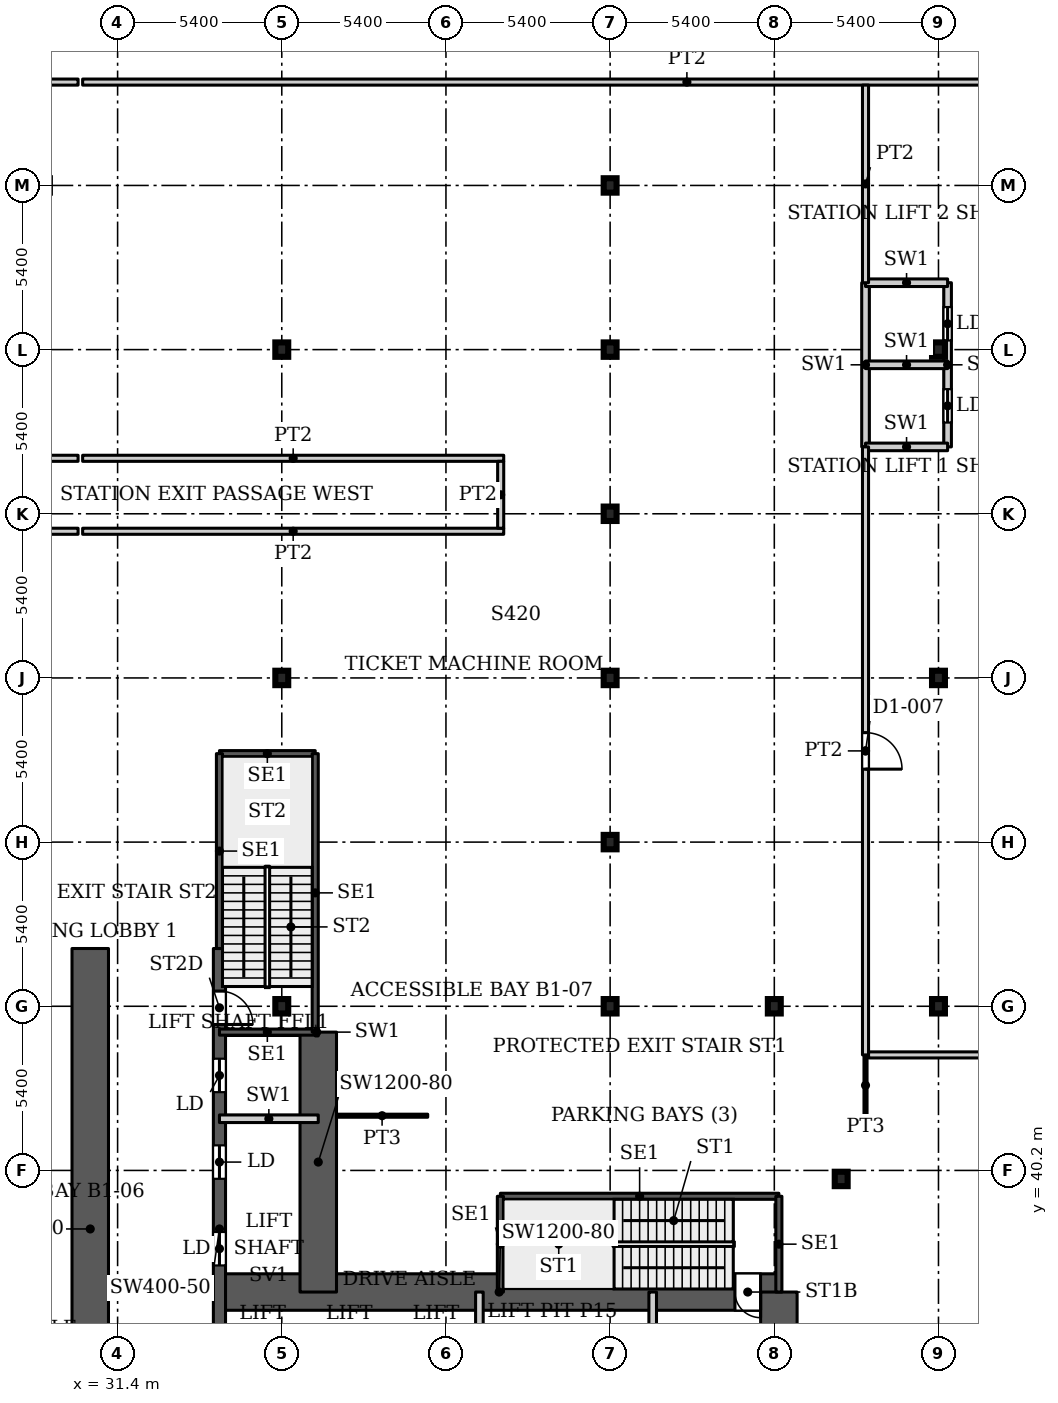
"""IFC4 building model, lengths in metres.
Left out: names, types, materials, properties, quantities, classifications, styles, units other than length and angle.
Written with IfcOpenShell. Run it as: python <this file> out.ifc"""

import sys

from ifc_helpers import new_model, si_unit, direction, frame, frame_2d, origin, origin_2d, place, context, subcontext, project, spatial, rectangle, i_section, extrude, source, transform, mapped, element, fill, save


model = new_model("IFC4")
c1 = context("Model", 3, precision=1e-05, world=origin(), true_north=direction((0.0, 1.0)))
c2 = subcontext(c1, "Body", "Model", "MODEL_VIEW")
j1 = project(units=[si_unit("LENGTHUNIT", "METRE"), si_unit("PLANEANGLEUNIT", "RADIAN")], contexts=[c1])
p1 = place(None, origin())
s1 = spatial("IfcSite", under=j1, at=p1, CompositionType="ELEMENT")
p2 = place(p1, origin())
s2 = spatial("IfcBuilding", under=s1, at=p2, CompositionType="ELEMENT")
p3 = place(p2, frame((0.0, 0.0, -5.0)))
s3 = spatial("IfcBuildingStorey", under=s2, at=p3, CompositionType="ELEMENT", Elevation=-5.0)
for number, where, z_axis, x_axis in (
    (1, (36.8, 45.6, 0.0), (0.0, 0.0, 1.0), (1.0, 0.0, 0.0)),
    (2, (47.6, 45.6, 0.0), (0.0, 0.0, 1.0), (1.0, 0.0, 0.0)),
    (3, (58.4, 45.6, 0.0), (0.0, 0.0, 1.0), (1.0, 0.0, 0.0)),
    (4, (36.8, 56.4, 0.0), (0.0, 0.0, 1.0), (1.0, 0.0, 0.0)),
    (5, (47.6, 56.4, 0.0), (0.0, 0.0, 1.0), (1.0, 0.0, 0.0)),
    (6, (58.4, 56.4, 0.0), (0.0, 0.0, 1.0), (1.0, 0.0, 0.0)),
    (7, (36.8, 67.2, 0.0), (0.0, 0.0, 1.0), (1.0, 0.0, 0.0)),
    (8, (47.6, 67.2, 0.0), (0.0, 0.0, 1.0), (1.0, 0.0, 0.0)),
    (9, (58.4, 67.2, 0.0), (0.0, 0.0, 1.0), (1.0, 0.0, 0.0)),
    (10, (53.0, 45.6, 0.0), (0.0, 0.0, 1.0), (1.0, 0.0, 0.0)),
    (11, (47.6, 51.0, 0.0), (0.0, 0.0, 1.0), (1.0, 0.0, 0.0)),
    (12, (47.6, 61.8, 0.0), (0.0, 0.0, 1.0), (1.0, 0.0, 0.0)),
    (13, (47.6, 72.6, 0.0), (0.0, 0.0, 1.0), (1.0, 0.0, 0.0)),
    (14, (55.2, 39.92, 0.0), (0.0, 0.0, 1.0), (1.0, 0.0, 0.0)),
):
    element("IfcColumn", number, at=place(p3, frame(where, z_axis=z_axis, x_axis=x_axis)), inside=s3, PredefinedType="COLUMN", context=c2, shape_type="SweptSolid", body=[
        extrude(i_section(OverallWidth=0.424, OverallDepth=0.474, WebThickness=0.048, FlangeThickness=0.077, FilletRadius=0.014, at=origin_2d()), origin(), (0.0, 0.0, 1.0), 5.0),
    ])
p4 = place(p3, frame((34.75, 36.2, 0.0), z_axis=(0.0, 0.0, 1.0), x_axis=(1.0, 0.0, 0.0)))
e15 = element("IfcWall", 15, at=p4, inside=s3, PredefinedType="SHEAR", context=c2, shape_type="SweptSolid", body=[
    extrude(rectangle(XDim=18.4, YDim=1.2, at=frame_2d((9.2, 0.0))), origin(), (0.0, 0.0, 1.0), 5.0),
])
p5 = place(p4, frame((16.955, 0.0, 0.0)))
e16 = element("IfcOpeningElement", 16, at=p5, cuts=e15, PredefinedType="OPENING", context=c2, shape_type="SweptSolid", body=[
    extrude(rectangle(XDim=0.843, YDim=2.2, at=frame_2d((0.421, 1.1))), frame((0.0, 0.61, 0.0), z_axis=(0.0, -1.0, 0.0), x_axis=(1.0, 0.0, 0.0)), (0.0, 0.0, 1.0), 1.22),
])
p6 = place(p3, frame((34.75, 29.05, 0.0), z_axis=(0.0, 0.0, 1.0), x_axis=(0.0, 1.0, 0.0)))
e17 = element("IfcWall", 17, at=p6, inside=s3, PredefinedType="SHEAR", context=c2, shape_type="SweptSolid", body=[
    extrude(rectangle(XDim=18.45, YDim=0.4, at=frame_2d((9.225, 0.0))), origin(), (0.0, 0.0, 1.0), 5.0),
])
p7 = place(p6, frame((8.025, 0.0, 0.0)))
e18 = element("IfcOpeningElement", 18, at=p7, cuts=e17, PredefinedType="OPENING", context=c2, shape_type="SweptSolid", body=[
    extrude(rectangle(XDim=1.1, YDim=2.2, at=frame_2d((0.55, 1.1))), frame((0.0, 0.21, 0.0), z_axis=(0.0, -1.0, 0.0), x_axis=(1.0, 0.0, 0.0)), (0.0, 0.0, 1.0), 0.42),
])
p8 = place(p6, frame((10.875, 0.0, 0.0)))
e19 = element("IfcOpeningElement", 19, at=p8, cuts=e17, PredefinedType="OPENING", context=c2, shape_type="SweptSolid", body=[
    extrude(rectangle(XDim=1.1, YDim=2.2, at=frame_2d((0.55, 1.1))), frame((0.0, 0.21, 0.0), z_axis=(0.0, -1.0, 0.0), x_axis=(1.0, 0.0, 0.0)), (0.0, 0.0, 1.0), 0.42),
])
p9 = place(p6, frame((13.725, 0.0, 0.0)))
e20 = element("IfcOpeningElement", 20, at=p9, cuts=e17, PredefinedType="OPENING", context=c2, shape_type="SweptSolid", body=[
    extrude(rectangle(XDim=1.1, YDim=2.2, at=frame_2d((0.55, 1.1))), frame((0.0, 0.21, 0.0), z_axis=(0.0, -1.0, 0.0), x_axis=(1.0, 0.0, 0.0)), (0.0, 0.0, 1.0), 0.42),
])
p10 = place(p6, frame((15.95, 0.0, 0.0)))
e21 = element("IfcOpeningElement", 21, at=p10, cuts=e17, PredefinedType="OPENING", context=c2, shape_type="SweptSolid", body=[
    extrude(rectangle(XDim=1.1, YDim=2.2, at=frame_2d((0.55, 1.1))), frame((0.0, 0.21, 0.0), z_axis=(0.0, -1.0, 0.0), x_axis=(1.0, 0.0, 0.0)), (0.0, 0.0, 1.0), 0.42),
])
p11 = place(p3, frame((38.0, 36.2, 0.0), z_axis=(0.0, 0.0, 1.0), x_axis=(0.0, 1.0, 0.0)))
e22 = element("IfcWall", 22, at=p11, inside=s3, PredefinedType="SHEAR", context=c2, shape_type="SweptSolid", body=[
    extrude(rectangle(XDim=8.55, YDim=1.2, at=frame_2d((4.275, 0.0))), origin(), (0.0, 0.0, 1.0), 5.0),
])
p12 = place(p3, frame((30.5, 29.05, 0.0), z_axis=(0.0, 0.0, 1.0), x_axis=(0.0, 1.0, 0.0)))
e23 = element("IfcWall", 23, at=p12, inside=s3, PredefinedType="SHEAR", context=c2, shape_type="SweptSolid", body=[
    extrude(rectangle(XDim=18.45, YDim=1.2, at=frame_2d((9.225, 0.0))), origin(), (0.0, 0.0, 1.0), 5.0),
])
p13 = place(p3, frame((53.15, 25.8, 0.0), z_axis=(0.0, 0.0, 1.0), x_axis=(0.0, 1.0, 0.0)))
e24 = element("IfcWall", 24, at=p13, inside=s3, PredefinedType="SHEAR", context=c2, shape_type="SweptSolid", body=[
    extrude(rectangle(XDim=10.4, YDim=1.2, at=frame_2d((5.2, 0.0))), origin(), (0.0, 0.0, 1.0), 5.0),
])
p14 = place(p3, frame((43.99, 39.35, 0.0), z_axis=(0.0, 0.0, 1.0), x_axis=(1.0, 0.0, 0.0)))
e25 = element("IfcWall", 25, at=p14, inside=s3, PredefinedType="SHEAR", context=c2, shape_type="SweptSolid", body=[
    extrude(rectangle(XDim=9.16, YDim=0.2, at=frame_2d((4.58, 0.0))), origin(), (0.0, 0.0, 1.0), 5.0),
])
for number, where, z_axis, x_axis in (
    (26, (43.99, 36.2, 0.0), (0.0, 0.0, 1.0), (0.0, 1.0, 0.0)),
    (27, (53.15, 36.2, 0.0), (0.0, 0.0, 1.0), (0.0, 1.0, 0.0)),
):
    element("IfcWall", number, at=place(p3, frame(where, z_axis=z_axis, x_axis=x_axis)), inside=s3, PredefinedType="SHEAR", context=c2, shape_type="SweptSolid", body=[
        extrude(rectangle(XDim=3.15, YDim=0.2, at=frame_2d((1.575, 0.0))), origin(), (0.0, 0.0, 1.0), 5.0),
    ])
for number, where, z_axis, x_axis in (
    (28, (34.75, 44.75, 0.0), (0.0, 0.0, 1.0), (1.0, 0.0, 0.0)),
    (29, (34.75, 53.91, 0.0), (0.0, 0.0, 1.0), (1.0, 0.0, 0.0)),
):
    element("IfcWall", number, at=place(p3, frame(where, z_axis=z_axis, x_axis=x_axis)), inside=s3, PredefinedType="SHEAR", context=c2, shape_type="SweptSolid", body=[
        extrude(rectangle(XDim=3.15, YDim=0.2, at=frame_2d((1.575, 0.0))), origin(), (0.0, 0.0, 1.0), 5.0),
    ])
p15 = place(p3, frame((34.75, 47.5, 0.0), z_axis=(0.0, 0.0, 1.0), x_axis=(0.0, 1.0, 0.0)))
e30 = element("IfcWall", 30, at=p15, inside=s3, PredefinedType="SHEAR", context=c2, shape_type="SweptSolid", body=[
    extrude(rectangle(XDim=6.41, YDim=0.2, at=frame_2d((3.205, 0.0))), origin(), (0.0, 0.0, 1.0), 5.0),
])
p16 = place(p3, frame((37.9, 44.75, 0.0), z_axis=(0.0, 0.0, 1.0), x_axis=(0.0, 1.0, 0.0)))
e31 = element("IfcWall", 31, at=p16, inside=s3, PredefinedType="SHEAR", context=c2, shape_type="SweptSolid", body=[
    extrude(rectangle(XDim=9.16, YDim=0.2, at=frame_2d((4.58, 0.0))), origin(), (0.0, 0.0, 1.0), 5.0),
])
for number, where, z_axis, x_axis in (
    (32, (43.3, 32.95, 0.0), (0.0, 0.0, 1.0), (0.0, 1.0, 0.0)),
    (33, (49.0, 32.95, 0.0), (0.0, 0.0, 1.0), (0.0, 1.0, 0.0)),
    (34, (34.75, 41.9, 0.0), (0.0, 0.0, 1.0), (1.0, 0.0, 0.0)),
):
    element("IfcWall", number, at=place(p3, frame(where, z_axis=z_axis, x_axis=x_axis)), inside=s3, PredefinedType="PARTITIONING", context=c2, shape_type="SweptSolid", body=[
        extrude(rectangle(XDim=3.25, YDim=0.25, at=frame_2d((1.625, 0.0))), origin(), (0.0, 0.0, 1.0), 5.0),
    ])
p17 = place(p3, frame((37.9, 44.75, 0.0), z_axis=(0.0, 0.0, 1.0), x_axis=(1.0, 0.0, 0.0)))
e35 = element("IfcWall", 35, at=p17, inside=s3, PredefinedType="PARTITIONING", context=c2, shape_type="SweptSolid", body=[
    extrude(rectangle(XDim=0.1, YDim=0.25, at=frame_2d((0.05, 0.0))), origin(), (0.0, 0.0, 1.0), 5.0),
])
p18 = place(p3, frame((56.0, 64.0, 0.0), z_axis=(0.0, 0.0, 1.0), x_axis=(0.0, 1.0, 0.0)))
e36 = element("IfcWall", 36, at=p18, inside=s3, PredefinedType="PARTITIONING", context=c2, shape_type="SweptSolid", body=[
    extrude(rectangle(XDim=5.4, YDim=0.25, at=frame_2d((2.7, 0.0))), origin(), (0.0, 0.0, 1.0), 5.0),
])
p19 = place(p3, frame((58.7, 64.0, 0.0), z_axis=(0.0, 0.0, 1.0), x_axis=(0.0, 1.0, 0.0)))
e37 = element("IfcWall", 37, at=p19, inside=s3, PredefinedType="PARTITIONING", context=c2, shape_type="SweptSolid", body=[
    extrude(rectangle(XDim=5.4, YDim=0.25, at=frame_2d((2.7, 0.0))), origin(), (0.0, 0.0, 1.0), 5.0),
])
p20 = place(p19, frame((0.8, 0.0, 0.0)))
e38 = element("IfcOpeningElement", 38, at=p20, cuts=e37, PredefinedType="OPENING", context=c2, shape_type="SweptSolid", body=[
    extrude(rectangle(XDim=1.1, YDim=2.2, at=frame_2d((0.55, 1.1))), frame((0.0, 0.135, 0.0), z_axis=(0.0, -1.0, 0.0), x_axis=(1.0, 0.0, 0.0)), (0.0, 0.0, 1.0), 0.27),
])
p21 = place(p19, frame((3.5, 0.0, 0.0)))
e39 = element("IfcOpeningElement", 39, at=p21, cuts=e37, PredefinedType="OPENING", context=c2, shape_type="SweptSolid", body=[
    extrude(rectangle(XDim=1.1, YDim=2.2, at=frame_2d((0.55, 1.1))), frame((0.0, 0.135, 0.0), z_axis=(0.0, -1.0, 0.0), x_axis=(1.0, 0.0, 0.0)), (0.0, 0.0, 1.0), 0.27),
])
for number, where, z_axis, x_axis in (
    (40, (56.0, 64.0, 0.0), (0.0, 0.0, 1.0), (1.0, 0.0, 0.0)),
    (41, (56.0, 66.7, 0.0), (0.0, 0.0, 1.0), (1.0, 0.0, 0.0)),
    (42, (56.0, 69.4, 0.0), (0.0, 0.0, 1.0), (1.0, 0.0, 0.0)),
):
    element("IfcWall", number, at=place(p3, frame(where, z_axis=z_axis, x_axis=x_axis)), inside=s3, PredefinedType="PARTITIONING", context=c2, shape_type="SweptSolid", body=[
        extrude(rectangle(XDim=2.7, YDim=0.25, at=frame_2d((1.35, 0.0))), origin(), (0.0, 0.0, 1.0), 5.0),
    ])
for number, where, z_axis, x_axis in (
    (43, (25.3, 61.225, 0.0), (0.0, 0.0, 1.0), (1.0, 0.0, 0.0)),
    (44, (25.3, 63.625, 0.0), (0.0, 0.0, 1.0), (1.0, 0.0, 0.0)),
    (45, (25.3, 76.0, 0.0), (0.0, 0.0, 1.0), (1.0, 0.0, 0.0)),
):
    element("IfcWall", number, at=place(p3, frame(where, z_axis=z_axis, x_axis=x_axis)), inside=s3, PredefinedType="PARTITIONING", context=c2, shape_type="SweptSolid", body=[
        extrude(rectangle(XDim=4.8, YDim=0.2, at=frame_2d((2.4, 0.0))), origin(), (0.0, 0.0, 1.0), 4.58),
    ])
for number, where, z_axis, x_axis in (
    (46, (30.25, 61.225, 0.0), (0.0, 0.0, 1.0), (1.0, 0.0, 0.0)),
    (47, (30.25, 63.625, 0.0), (0.0, 0.0, 1.0), (1.0, 0.0, 0.0)),
):
    element("IfcWall", number, at=place(p3, frame(where, z_axis=z_axis, x_axis=x_axis)), inside=s3, PredefinedType="PARTITIONING", context=c2, shape_type="SweptSolid", body=[
        extrude(rectangle(XDim=13.85, YDim=0.2, at=frame_2d((6.925, 0.0))), origin(), (0.0, 0.0, 1.0), 4.58),
    ])
p22 = place(p3, frame((30.25, 76.0, 0.0), z_axis=(0.0, 0.0, 1.0), x_axis=(1.0, 0.0, 0.0)))
e48 = element("IfcWall", 48, at=p22, inside=s3, PredefinedType="PARTITIONING", context=c2, shape_type="SweptSolid", body=[
    extrude(rectangle(XDim=39.75, YDim=0.2, at=frame_2d((19.875, 0.0))), origin(), (0.0, 0.0, 1.0), 4.58),
])
p23 = place(p22, frame((31.45, 0.0, 0.0)))
e49 = element("IfcOpeningElement", 49, at=p23, cuts=e48, PredefinedType="OPENING", context=c2, shape_type="SweptSolid", body=[
    extrude(rectangle(XDim=2.4, YDim=2.1, at=frame_2d((1.2, 1.05))), frame((0.0, 0.11, 0.0), z_axis=(0.0, -1.0, 0.0), x_axis=(1.0, 0.0, 0.0)), (0.0, 0.0, 1.0), 0.22),
])
p24 = place(p3, frame((38.599, 42.0, 0.0), z_axis=(0.0, 0.0, 1.0), x_axis=(1.0, 0.0, 0.0)))
e50 = element("IfcWall", 50, at=p24, inside=s3, PredefinedType="PARTITIONING", context=c2, shape_type="SweptSolid", body=[
    extrude(rectangle(XDim=3.001, YDim=0.1, at=frame_2d((1.5, 0.0))), origin(), (0.0, 0.0, 1.0), 4.58),
])
p25 = place(p3, frame((44.0, 61.325, 0.0), z_axis=(0.0, 0.0, 1.0), x_axis=(0.0, 1.0, 0.0)))
e51 = element("IfcWall", 51, at=p25, inside=s3, PredefinedType="PARTITIONING", context=c2, shape_type="SweptSolid", body=[
    extrude(rectangle(XDim=2.2, YDim=0.2, at=frame_2d((1.1, 0.0))), origin(), (0.0, 0.0, 1.0), 4.58),
])
p26 = place(p3, frame((56.0, 42.0, 0.0), z_axis=(0.0, 0.0, 1.0), x_axis=(0.0, 1.0, 0.0)))
e52 = element("IfcWall", 52, at=p26, inside=s3, PredefinedType="PARTITIONING", context=c2, shape_type="SweptSolid", body=[
    extrude(rectangle(XDim=2.0, YDim=0.1, at=frame_2d((1.0, 0.0))), origin(), (0.0, 0.0, 1.0), 4.58),
])
p27 = place(p3, frame((56.0, 44.0, 0.0), z_axis=(0.0, 0.0, 1.0), x_axis=(0.0, 1.0, 0.0)))
e53 = element("IfcWall", 53, at=p27, inside=s3, PredefinedType="PARTITIONING", context=c2, shape_type="SweptSolid", body=[
    extrude(rectangle(XDim=20.0, YDim=0.2, at=frame_2d((10.0, 0.0))), origin(), (0.0, 0.0, 1.0), 4.58),
])
p28 = place(p27, frame((9.4, 0.0, 0.0)))
e54 = element("IfcOpeningElement", 54, at=p28, cuts=e53, PredefinedType="OPENING", context=c2, shape_type="SweptSolid", body=[
    extrude(rectangle(XDim=1.2, YDim=2.1, at=frame_2d((0.6, 1.05))), frame((0.0, 0.11, 0.0), z_axis=(0.0, -1.0, 0.0), x_axis=(1.0, 0.0, 0.0)), (0.0, 0.0, 1.0), 0.22),
])
p29 = place(p3, frame((56.0, 69.4, 0.0), z_axis=(0.0, 0.0, 1.0), x_axis=(0.0, 1.0, 0.0)))
e55 = element("IfcWall", 55, at=p29, inside=s3, PredefinedType="PARTITIONING", context=c2, shape_type="SweptSolid", body=[
    extrude(rectangle(XDim=6.5, YDim=0.2, at=frame_2d((3.25, 0.0))), origin(), (0.0, 0.0, 1.0), 4.58),
])
p30 = place(p3, frame((56.1, 44.0, 0.0), z_axis=(0.0, 0.0, 1.0), x_axis=(1.0, 0.0, 0.0)))
e56 = element("IfcWall", 56, at=p30, inside=s3, PredefinedType="PARTITIONING", context=c2, shape_type="SweptSolid", body=[
    extrude(rectangle(XDim=59.775, YDim=0.2, at=frame_2d((29.887, 0.0))), origin(), (0.0, 0.0, 1.0), 4.58),
])
p31 = place(p30, frame((11.3, 0.0, 0.0)))
e57 = element("IfcOpeningElement", 57, at=p31, cuts=e56, PredefinedType="OPENING", context=c2, shape_type="SweptSolid", body=[
    extrude(rectangle(XDim=1.2, YDim=2.1, at=frame_2d((0.6, 1.05))), frame((0.0, 0.11, 0.0), z_axis=(0.0, -1.0, 0.0), x_axis=(1.0, 0.0, 0.0)), (0.0, 0.0, 1.0), 0.22),
])
p32 = place(p30, frame((29.3, 0.0, 0.0)))
e58 = element("IfcOpeningElement", 58, at=p32, cuts=e56, PredefinedType="OPENING", context=c2, shape_type="SweptSolid", body=[
    extrude(rectangle(XDim=1.2, YDim=2.1, at=frame_2d((0.6, 1.05))), frame((0.0, 0.11, 0.0), z_axis=(0.0, -1.0, 0.0), x_axis=(1.0, 0.0, 0.0)), (0.0, 0.0, 1.0), 0.22),
])
p33 = place(p30, frame((39.3, 0.0, 0.0)))
e59 = element("IfcOpeningElement", 59, at=p33, cuts=e56, PredefinedType="OPENING", context=c2, shape_type="SweptSolid", body=[
    extrude(rectangle(XDim=1.0, YDim=2.1, at=frame_2d((0.5, 1.05))), frame((0.0, 0.11, 0.0), z_axis=(0.0, -1.0, 0.0), x_axis=(1.0, 0.0, 0.0)), (0.0, 0.0, 1.0), 0.22),
])
p34 = place(p30, frame((47.3, 0.0, 0.0)))
e60 = element("IfcOpeningElement", 60, at=p34, cuts=e56, PredefinedType="OPENING", context=c2, shape_type="SweptSolid", body=[
    extrude(rectangle(XDim=1.0, YDim=2.1, at=frame_2d((0.5, 1.05))), frame((0.0, 0.11, 0.0), z_axis=(0.0, -1.0, 0.0), x_axis=(1.0, 0.0, 0.0)), (0.0, 0.0, 1.0), 0.22),
])
p35 = place(p30, frame((50.25, 0.0, 0.0)))
e61 = element("IfcOpeningElement", 61, at=p35, cuts=e56, PredefinedType="OPENING", context=c2, shape_type="SweptSolid", body=[
    extrude(rectangle(XDim=1.2, YDim=2.1, at=frame_2d((0.6, 1.05))), frame((0.0, 0.11, 0.0), z_axis=(0.0, -1.0, 0.0), x_axis=(1.0, 0.0, 0.0)), (0.0, 0.0, 1.0), 0.22),
])
p36 = place(p30, frame((54.8, 0.0, 0.0)))
e62 = element("IfcOpeningElement", 62, at=p36, cuts=e56, PredefinedType="OPENING", context=c2, shape_type="SweptSolid", body=[
    extrude(rectangle(XDim=1.0, YDim=2.1, at=frame_2d((0.5, 1.05))), frame((0.0, 0.11, 0.0), z_axis=(0.0, -1.0, 0.0), x_axis=(1.0, 0.0, 0.0)), (0.0, 0.0, 1.0), 0.22),
])
m1 = source(origin(), c2, "Body", "SweptSolid", [
    extrude(rectangle(XDim=1.1, YDim=2.2, at=frame_2d((0.55, 1.1))), frame((0.0, 0.025, 0.0), z_axis=(0.0, -1.0, 0.0), x_axis=(1.0, 0.0, 0.0)), (0.0, 0.0, 1.0), 0.05),
])
p37 = place(p7, origin())
e63 = element("IfcDoor", 63, at=p37, inside=s3, OperationType="SLIDING_TO_LEFT", PredefinedType="DOOR", context=c2, shape_type="MappedRepresentation", body=[
    mapped(m1, transform((0.0, 0.0, 0.0), x_axis=(1.0, 0.0, 0.0), y_axis=(0.0, 1.0, 0.0), z_axis=(0.0, 0.0, 1.0), scale=1.0)),
])
fill(e18, e63)
p38 = place(p8, origin())
e64 = element("IfcDoor", 64, at=p38, inside=s3, OperationType="SLIDING_TO_LEFT", PredefinedType="DOOR", context=c2, shape_type="MappedRepresentation", body=[
    mapped(m1, transform((0.0, 0.0, 0.0), x_axis=(1.0, 0.0, 0.0), y_axis=(0.0, 1.0, 0.0), z_axis=(0.0, 0.0, 1.0), scale=1.0)),
])
fill(e19, e64)
p39 = place(p9, origin())
e65 = element("IfcDoor", 65, at=p39, inside=s3, OperationType="SLIDING_TO_LEFT", PredefinedType="DOOR", context=c2, shape_type="MappedRepresentation", body=[
    mapped(m1, transform((0.0, 0.0, 0.0), x_axis=(1.0, 0.0, 0.0), y_axis=(0.0, 1.0, 0.0), z_axis=(0.0, 0.0, 1.0), scale=1.0)),
])
fill(e20, e65)
p40 = place(p20, origin())
e66 = element("IfcDoor", 66, at=p40, inside=s3, OperationType="SLIDING_TO_LEFT", PredefinedType="DOOR", context=c2, shape_type="MappedRepresentation", body=[
    mapped(m1, transform((0.0, 0.0, 0.0), x_axis=(1.0, 0.0, 0.0), y_axis=(0.0, 1.0, 0.0), z_axis=(0.0, 0.0, 1.0), scale=1.0)),
])
fill(e38, e66)
p41 = place(p21, origin())
e67 = element("IfcDoor", 67, at=p41, inside=s3, OperationType="SLIDING_TO_LEFT", PredefinedType="DOOR", context=c2, shape_type="MappedRepresentation", body=[
    mapped(m1, transform((0.0, 0.0, 0.0), x_axis=(1.0, 0.0, 0.0), y_axis=(0.0, 1.0, 0.0), z_axis=(0.0, 0.0, 1.0), scale=1.0)),
])
fill(e39, e67)
m2 = source(origin(), c2, "Body", "SweptSolid", [
    extrude(rectangle(XDim=0.843, YDim=2.2, at=frame_2d((0.421, 1.1))), frame((0.0, 0.025, 0.0), z_axis=(0.0, -1.0, 0.0), x_axis=(1.0, 0.0, 0.0)), (0.0, 0.0, 1.0), 0.05),
])
p42 = place(p5, origin())
e68 = element("IfcDoor", 68, at=p42, inside=s3, OperationType="SINGLE_SWING_RIGHT", PredefinedType="DOOR", context=c2, shape_type="MappedRepresentation", body=[
    mapped(m2, transform((0.0, 0.0, 0.0), x_axis=(1.0, 0.0, 0.0), y_axis=(0.0, 1.0, 0.0), z_axis=(0.0, 0.0, 1.0), scale=1.0)),
])
fill(e16, e68)
m3 = source(origin(), c2, "Body", "SweptSolid", [
    extrude(rectangle(XDim=1.1, YDim=2.2, at=frame_2d((0.55, 1.1))), frame((0.0, 0.025, 0.0), z_axis=(0.0, -1.0, 0.0), x_axis=(1.0, 0.0, 0.0)), (0.0, 0.0, 1.0), 0.05),
])
p43 = place(p10, origin())
e69 = element("IfcDoor", 69, at=p43, inside=s3, OperationType="SINGLE_SWING_RIGHT", PredefinedType="DOOR", context=c2, shape_type="MappedRepresentation", body=[
    mapped(m3, transform((0.0, 0.0, 0.0), x_axis=(1.0, 0.0, 0.0), y_axis=(0.0, 1.0, 0.0), z_axis=(0.0, 0.0, 1.0), scale=1.0)),
])
fill(e21, e69)
m4 = source(origin(), c2, "Body", "SweptSolid", [
    extrude(rectangle(XDim=1.2, YDim=2.1, at=frame_2d((0.6, 1.05))), frame((0.0, 0.025, 0.0), z_axis=(0.0, -1.0, 0.0), x_axis=(1.0, 0.0, 0.0)), (0.0, 0.0, 1.0), 0.05),
])
p44 = place(p28, origin())
e70 = element("IfcDoor", 70, at=p44, inside=s3, OperationType="SINGLE_SWING_RIGHT", PredefinedType="DOOR", context=c2, shape_type="MappedRepresentation", body=[
    mapped(m4, transform((0.0, 0.0, 0.0), x_axis=(1.0, 0.0, 0.0), y_axis=(0.0, 1.0, 0.0), z_axis=(0.0, 0.0, 1.0), scale=1.0)),
])
fill(e54, e70)
save(model, sys.argv[1])
